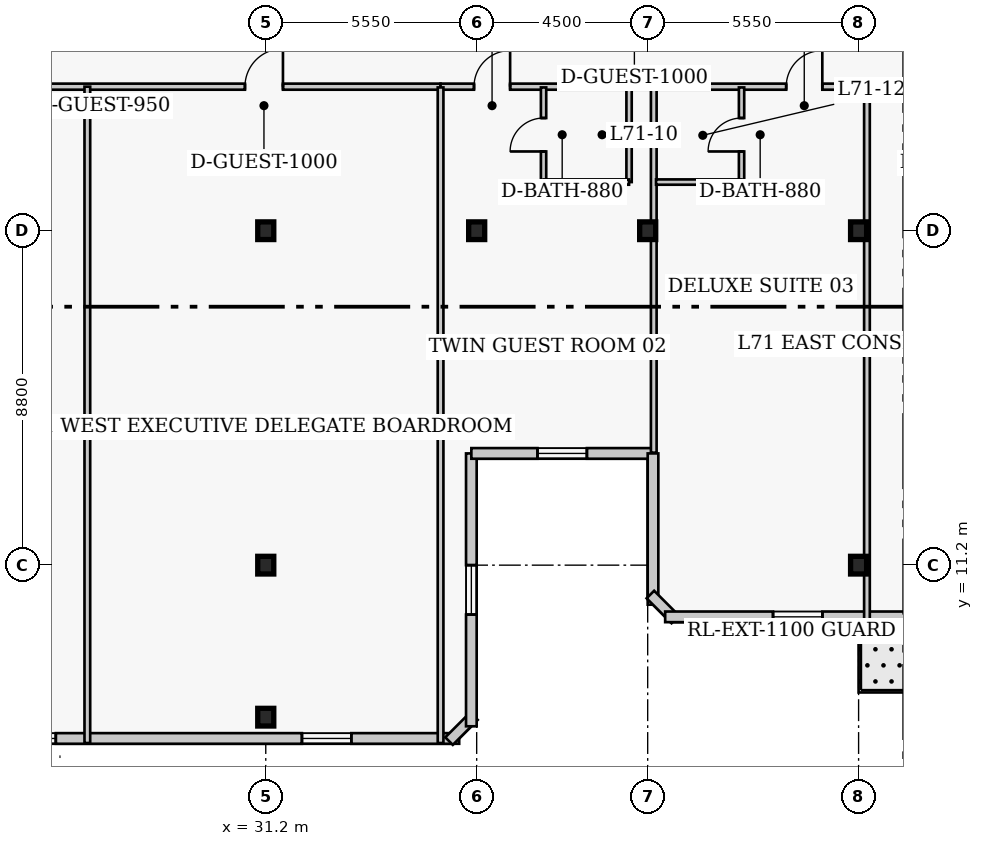
"""IFC4 building model, lengths in metres.
Left out: names, types, materials, properties, quantities, classifications, styles, units other than length and angle.
Written with IfcOpenShell. Run it as: python <this file> out.ifc"""

import sys

from ifc_helpers import new_model, si_unit, direction, frame, frame_2d, origin, origin_2d, place, context, subcontext, project, spatial, rectangle, i_section, extrude, element, fill, save


model = new_model("IFC4")
c1 = context("Model", 3, precision=1e-05, world=origin(), true_north=direction((0.0, 1.0)))
c2 = subcontext(c1, "Body", "Model", "MODEL_VIEW")
j1 = project(units=[si_unit("LENGTHUNIT", "METRE"), si_unit("PLANEANGLEUNIT", "RADIAN")], contexts=[c1])
p1 = place(None, origin())
s1 = spatial("IfcSite", under=j1, at=p1, CompositionType="ELEMENT")
p2 = place(p1, origin())
s2 = spatial("IfcBuilding", under=s1, at=p2, CompositionType="ELEMENT")
p3 = place(p2, frame((0.0, 0.0, 285.4)))
s3 = spatial("IfcBuildingStorey", under=s2, at=p3, CompositionType="ELEMENT", Elevation=285.4)
for number, where, z_axis, x_axis in (
    (1, (31.2, 11.2, 0.0), (0.0, 0.0, 1.0), (1.0, 0.0, 0.0)),
    (2, (31.2, 20.0, 0.0), (0.0, 0.0, 1.0), (1.0, 0.0, 0.0)),
    (3, (36.75, 20.0, 0.0), (0.0, 0.0, 1.0), (1.0, 0.0, 0.0)),
    (4, (41.25, 20.0, 0.0), (0.0, 0.0, 1.0), (1.0, 0.0, 0.0)),
    (5, (46.8, 11.2, 0.0), (0.0, 0.0, 1.0), (1.0, 0.0, 0.0)),
    (6, (46.8, 20.0, 0.0), (0.0, 0.0, 1.0), (1.0, 0.0, 0.0)),
    (7, (31.2, 7.2, 0.0), (0.0, 0.0, 1.0), (1.0, 0.0, 0.0)),
):
    element("IfcColumn", number, at=place(p3, frame(where, z_axis=z_axis, x_axis=x_axis)), inside=s3, PredefinedType="COLUMN", context=c2, shape_type="SweptSolid", body=[
        extrude(i_section(OverallWidth=0.422, OverallDepth=0.465, WebThickness=0.045, FlangeThickness=0.073, FilletRadius=0.017, at=origin_2d()), origin(), (0.0, 0.0, 1.0), 4.0),
    ])
p4 = place(p3, frame((11.46, 6.64, 0.0), z_axis=(0.0, 0.0, 1.0), x_axis=(1.0, 0.0, 0.0)))
e8 = element("IfcWall", 8, at=p4, inside=s3, PredefinedType="SOLIDWALL", context=c2, shape_type="SweptSolid", body=[
    extrude(rectangle(XDim=24.83, YDim=0.28, at=frame_2d((12.415, 0.0))), origin(), (0.0, 0.0, 1.0), 3.76),
])
p5 = place(p4, frame((3.488, 0.0, 0.85)))
e9 = element("IfcOpeningElement", 9, at=p5, cuts=e8, PredefinedType="OPENING", context=c2, shape_type="SweptSolid", body=[
    extrude(rectangle(XDim=1.3, YDim=1.7, at=frame_2d((0.65, 0.85))), frame((0.0, 0.15, 0.0), z_axis=(0.0, -1.0, 0.0), x_axis=(1.0, 0.0, 0.0)), (0.0, 0.0, 1.0), 0.3),
])
p6 = place(p4, frame((12.915, 0.0, 0.85)))
e10 = element("IfcOpeningElement", 10, at=p6, cuts=e8, PredefinedType="OPENING", context=c2, shape_type="SweptSolid", body=[
    extrude(rectangle(XDim=1.3, YDim=1.7, at=frame_2d((0.65, 0.85))), frame((0.0, 0.15, 0.0), z_axis=(0.0, -1.0, 0.0), x_axis=(1.0, 0.0, 0.0)), (0.0, 0.0, 1.0), 0.3),
])
p7 = place(p4, frame((20.692, 0.0, 0.85)))
e11 = element("IfcOpeningElement", 11, at=p7, cuts=e8, PredefinedType="OPENING", context=c2, shape_type="SweptSolid", body=[
    extrude(rectangle(XDim=1.3, YDim=1.7, at=frame_2d((0.65, 0.85))), frame((0.0, 0.15, 0.0), z_axis=(0.0, -1.0, 0.0), x_axis=(1.0, 0.0, 0.0)), (0.0, 0.0, 1.0), 0.3),
])
p8 = place(p3, frame((36.023, 6.571, 0.0), z_axis=(0.0, 0.0, 1.0), x_axis=(0.707106781187, 0.707106781187, 0.0)))
e12 = element("IfcWall", 12, at=p8, inside=s3, PredefinedType="SOLIDWALL", context=c2, shape_type="SweptSolid", body=[
    extrude(rectangle(XDim=0.928, YDim=0.28, at=frame_2d((0.464, 0.0))), origin(), (0.0, 0.0, 1.0), 3.76),
])
p9 = place(p3, frame((36.61, 6.96, 0.0), z_axis=(0.0, 0.0, 1.0), x_axis=(0.0, 1.0, 0.0)))
e13 = element("IfcWall", 13, at=p9, inside=s3, PredefinedType="SOLIDWALL", context=c2, shape_type="SweptSolid", body=[
    extrude(rectangle(XDim=7.18, YDim=0.28, at=frame_2d((3.59, 0.0))), origin(), (0.0, 0.0, 1.0), 3.76),
])
p10 = place(p9, frame((2.94, 0.0, 0.85)))
e14 = element("IfcOpeningElement", 14, at=p10, cuts=e13, PredefinedType="OPENING", context=c2, shape_type="SweptSolid", body=[
    extrude(rectangle(XDim=1.3, YDim=1.7, at=frame_2d((0.65, 0.85))), frame((0.0, 0.15, 0.0), z_axis=(0.0, -1.0, 0.0), x_axis=(1.0, 0.0, 0.0)), (0.0, 0.0, 1.0), 0.3),
])
p11 = place(p3, frame((36.61, 14.14, 0.0), z_axis=(0.0, 0.0, 1.0), x_axis=(1.0, 0.0, 0.0)))
e15 = element("IfcWall", 15, at=p11, inside=s3, PredefinedType="SOLIDWALL", context=c2, shape_type="SweptSolid", body=[
    extrude(rectangle(XDim=4.78, YDim=0.28, at=frame_2d((2.39, 0.0))), origin(), (0.0, 0.0, 1.0), 3.76),
])
p12 = place(p11, frame((1.74, 0.0, 0.85)))
e16 = element("IfcOpeningElement", 16, at=p12, cuts=e15, PredefinedType="OPENING", context=c2, shape_type="SweptSolid", body=[
    extrude(rectangle(XDim=1.3, YDim=1.7, at=frame_2d((0.65, 0.85))), frame((0.0, 0.15, 0.0), z_axis=(0.0, -1.0, 0.0), x_axis=(1.0, 0.0, 0.0)), (0.0, 0.0, 1.0), 0.3),
])
p13 = place(p3, frame((41.39, 14.14, 0.0), z_axis=(0.0, 0.0, 1.0), x_axis=(0.0, -1.0, 0.0)))
e17 = element("IfcWall", 17, at=p13, inside=s3, PredefinedType="SOLIDWALL", context=c2, shape_type="SweptSolid", body=[
    extrude(rectangle(XDim=3.98, YDim=0.28, at=frame_2d((1.99, 0.0))), origin(), (0.0, 0.0, 1.0), 3.76),
])
p14 = place(p3, frame((41.321, 10.427, 0.0), z_axis=(0.0, 0.0, 1.0), x_axis=(0.707106781187, -0.707106781187, 0.0)))
e18 = element("IfcWall", 18, at=p14, inside=s3, PredefinedType="SOLIDWALL", context=c2, shape_type="SweptSolid", body=[
    extrude(rectangle(XDim=0.928, YDim=0.28, at=frame_2d((0.464, 0.0))), origin(), (0.0, 0.0, 1.0), 3.76),
])
p15 = place(p3, frame((41.71, 9.84, 0.0), z_axis=(0.0, 0.0, 1.0), x_axis=(1.0, 0.0, 0.0)))
e19 = element("IfcWall", 19, at=p15, inside=s3, PredefinedType="SOLIDWALL", context=c2, shape_type="SweptSolid", body=[
    extrude(rectangle(XDim=24.83, YDim=0.28, at=frame_2d((12.415, 0.0))), origin(), (0.0, 0.0, 1.0), 3.76),
])
p16 = place(p15, frame((8.29, 0.0, 0.0)))
e20 = element("IfcOpeningElement", 20, at=p16, cuts=e19, PredefinedType="OPENING", context=c2, shape_type="SweptSolid", body=[
    extrude(rectangle(XDim=1.4, YDim=2.15, at=frame_2d((0.7, 1.075))), frame((0.0, 0.15, 0.0), z_axis=(0.0, -1.0, 0.0), x_axis=(1.0, 0.0, 0.0)), (0.0, 0.0, 1.0), 0.3),
])
p17 = place(p15, frame((2.838, 0.0, 0.85)))
e21 = element("IfcOpeningElement", 21, at=p17, cuts=e19, PredefinedType="OPENING", context=c2, shape_type="SweptSolid", body=[
    extrude(rectangle(XDim=1.3, YDim=1.7, at=frame_2d((0.65, 0.85))), frame((0.0, 0.15, 0.0), z_axis=(0.0, -1.0, 0.0), x_axis=(1.0, 0.0, 0.0)), (0.0, 0.0, 1.0), 0.3),
])
p18 = place(p15, frame((18.892, 0.0, 0.85)))
e22 = element("IfcOpeningElement", 22, at=p18, cuts=e19, PredefinedType="OPENING", context=c2, shape_type="SweptSolid", body=[
    extrude(rectangle(XDim=1.3, YDim=1.7, at=frame_2d((0.65, 0.85))), frame((0.0, 0.15, 0.0), z_axis=(0.0, -1.0, 0.0), x_axis=(1.0, 0.0, 0.0)), (0.0, 0.0, 1.0), 0.3),
])
p19 = place(p15, frame((13.085, 0.0, 0.85)))
e23 = element("IfcOpeningElement", 23, at=p19, cuts=e19, PredefinedType="OPENING", context=c2, shape_type="SweptSolid", body=[
    extrude(rectangle(XDim=1.3, YDim=1.7, at=frame_2d((0.65, 0.85))), frame((0.0, 0.15, 0.0), z_axis=(0.0, -1.0, 0.0), x_axis=(1.0, 0.0, 0.0)), (0.0, 0.0, 1.0), 0.3),
])
p20 = place(p3, frame((19.35, 23.79, 0.0), z_axis=(0.0, 0.0, 1.0), x_axis=(1.0, 0.0, 0.0)))
e24 = element("IfcWall", 24, at=p20, inside=s3, PredefinedType="PARTITIONING", context=c2, shape_type="SweptSolid", body=[
    extrude(rectangle(XDim=16.45, YDim=0.16, at=frame_2d((8.225, 0.0))), origin(), (0.0, 0.0, 1.0), 3.76),
])
p21 = place(p20, frame((4.288, 0.0, 0.0)))
e25 = element("IfcOpeningElement", 25, at=p21, cuts=e24, PredefinedType="OPENING", context=c2, shape_type="SweptSolid", body=[
    extrude(rectangle(XDim=0.95, YDim=2.1, at=frame_2d((0.475, 1.05))), frame((0.0, 0.09, 0.0), z_axis=(0.0, -1.0, 0.0), x_axis=(1.0, 0.0, 0.0)), (0.0, 0.0, 1.0), 0.18),
])
p22 = place(p20, frame((11.302, 0.0, 0.0)))
e26 = element("IfcOpeningElement", 26, at=p22, cuts=e24, PredefinedType="OPENING", context=c2, shape_type="SweptSolid", body=[
    extrude(rectangle(XDim=1.0, YDim=2.15, at=frame_2d((0.5, 1.075))), frame((0.0, 0.09, 0.0), z_axis=(0.0, -1.0, 0.0), x_axis=(1.0, 0.0, 0.0)), (0.0, 0.0, 1.0), 0.18),
])
p23 = place(p3, frame((35.8, 23.79, 0.0), z_axis=(0.0, 0.0, 1.0), x_axis=(1.0, 0.0, 0.0)))
e27 = element("IfcWall", 27, at=p23, inside=s3, PredefinedType="PARTITIONING", context=c2, shape_type="SweptSolid", body=[
    extrude(rectangle(XDim=24.66, YDim=0.16, at=frame_2d((12.33, 0.0))), origin(), (0.0, 0.0, 1.0), 3.76),
])
p24 = place(p23, frame((0.88, 0.0, 0.0)))
e28 = element("IfcOpeningElement", 28, at=p24, cuts=e27, PredefinedType="OPENING", context=c2, shape_type="SweptSolid", body=[
    extrude(rectangle(XDim=0.95, YDim=2.1, at=frame_2d((0.475, 1.05))), frame((0.0, 0.09, 0.0), z_axis=(0.0, -1.0, 0.0), x_axis=(1.0, 0.0, 0.0)), (0.0, 0.0, 1.0), 0.18),
])
p25 = place(p23, frame((9.095, 0.0, 0.0)))
e29 = element("IfcOpeningElement", 29, at=p25, cuts=e27, PredefinedType="OPENING", context=c2, shape_type="SweptSolid", body=[
    extrude(rectangle(XDim=0.95, YDim=2.1, at=frame_2d((0.475, 1.05))), frame((0.0, 0.09, 0.0), z_axis=(0.0, -1.0, 0.0), x_axis=(1.0, 0.0, 0.0)), (0.0, 0.0, 1.0), 0.18),
])
p26 = place(p23, frame((13.525, 0.0, 0.0)))
e30 = element("IfcOpeningElement", 30, at=p26, cuts=e27, PredefinedType="OPENING", context=c2, shape_type="SweptSolid", body=[
    extrude(rectangle(XDim=1.0, YDim=2.15, at=frame_2d((0.5, 1.075))), frame((0.0, 0.09, 0.0), z_axis=(0.0, -1.0, 0.0), x_axis=(1.0, 0.0, 0.0)), (0.0, 0.0, 1.0), 0.18),
])
p27 = place(p23, frame((18.005, 0.0, 0.0)))
e31 = element("IfcOpeningElement", 31, at=p27, cuts=e27, PredefinedType="OPENING", context=c2, shape_type="SweptSolid", body=[
    extrude(rectangle(XDim=0.95, YDim=2.1, at=frame_2d((0.475, 1.05))), frame((0.0, 0.09, 0.0), z_axis=(0.0, -1.0, 0.0), x_axis=(1.0, 0.0, 0.0)), (0.0, 0.0, 1.0), 0.18),
])
p28 = place(p23, frame((23.115, 0.0, 0.0)))
e32 = element("IfcOpeningElement", 32, at=p28, cuts=e27, PredefinedType="OPENING", context=c2, shape_type="SweptSolid", body=[
    extrude(rectangle(XDim=0.95, YDim=2.1, at=frame_2d((0.475, 1.05))), frame((0.0, 0.09, 0.0), z_axis=(0.0, -1.0, 0.0), x_axis=(1.0, 0.0, 0.0)), (0.0, 0.0, 1.0), 0.18),
])
p29 = place(p3, frame((26.505, 6.52, 0.0), z_axis=(0.0, 0.0, 1.0), x_axis=(0.0, 1.0, 0.0)))
e33 = element("IfcWall", 33, at=p29, inside=s3, PredefinedType="PARTITIONING", context=c2, shape_type="SweptSolid", body=[
    extrude(rectangle(XDim=17.27, YDim=0.15, at=frame_2d((8.635, 0.0))), origin(), (0.0, 0.0, 1.0), 3.76),
])
p30 = place(p3, frame((35.8, 6.52, 0.0), z_axis=(0.0, 0.0, 1.0), x_axis=(0.0, 1.0, 0.0)))
e34 = element("IfcWall", 34, at=p30, inside=s3, PredefinedType="PARTITIONING", context=c2, shape_type="SweptSolid", body=[
    extrude(rectangle(XDim=17.25, YDim=0.15, at=frame_2d((8.625, 0.0))), origin(), (0.0, 0.0, 1.0), 3.76),
])
p31 = place(p3, frame((38.51, 21.28, 0.0), z_axis=(0.0, 0.0, 1.0), x_axis=(0.0, 1.0, 0.0)))
e35 = element("IfcWall", 35, at=p31, inside=s3, PredefinedType="PLUMBINGWALL", context=c2, shape_type="SweptSolid", body=[
    extrude(rectangle(XDim=2.49, YDim=0.14, at=frame_2d((1.245, 0.0))), origin(), (0.0, 0.0, 1.0), 3.76),
])
p32 = place(p31, frame((0.805, 0.0, 0.0)))
e36 = element("IfcOpeningElement", 36, at=p32, cuts=e35, PredefinedType="OPENING", context=c2, shape_type="SweptSolid", body=[
    extrude(rectangle(XDim=0.88, YDim=2.05, at=frame_2d((0.44, 1.025))), frame((0.0, 0.08, 0.0), z_axis=(0.0, -1.0, 0.0), x_axis=(1.0, 0.0, 0.0)), (0.0, 0.0, 1.0), 0.16),
])
p33 = place(p3, frame((40.76, 21.28, 0.0), z_axis=(0.0, 0.0, 1.0), x_axis=(0.0, 1.0, 0.0)))
e37 = element("IfcWall", 37, at=p33, inside=s3, PredefinedType="PLUMBINGWALL", context=c2, shape_type="SweptSolid", body=[
    extrude(rectangle(XDim=2.49, YDim=0.14, at=frame_2d((1.245, 0.0))), origin(), (0.0, 0.0, 1.0), 3.76),
])
p34 = place(p3, frame((38.51, 21.28, 0.0), z_axis=(0.0, 0.0, 1.0), x_axis=(1.0, 0.0, 0.0)))
e38 = element("IfcWall", 38, at=p34, inside=s3, PredefinedType="PLUMBINGWALL", context=c2, shape_type="SweptSolid", body=[
    extrude(rectangle(XDim=2.25, YDim=0.14, at=frame_2d((1.125, 0.0))), origin(), (0.0, 0.0, 1.0), 3.76),
])
p35 = place(p3, frame((41.41, 14.16, 0.0), z_axis=(0.0, 0.0, 1.0), x_axis=(0.0, 1.0, 0.0)))
e39 = element("IfcWall", 39, at=p35, inside=s3, PredefinedType="PARTITIONING", context=c2, shape_type="SweptSolid", body=[
    extrude(rectangle(XDim=9.63, YDim=0.15, at=frame_2d((4.815, 0.0))), origin(), (0.0, 0.0, 1.0), 3.76),
])
p36 = place(p3, frame((43.72, 21.28, 0.0), z_axis=(0.0, 0.0, 1.0), x_axis=(0.0, 1.0, 0.0)))
e40 = element("IfcWall", 40, at=p36, inside=s3, PredefinedType="PLUMBINGWALL", context=c2, shape_type="SweptSolid", body=[
    extrude(rectangle(XDim=2.49, YDim=0.14, at=frame_2d((1.245, 0.0))), origin(), (0.0, 0.0, 1.0), 3.76),
])
p37 = place(p36, frame((0.805, 0.0, 0.0)))
e41 = element("IfcOpeningElement", 41, at=p37, cuts=e40, PredefinedType="OPENING", context=c2, shape_type="SweptSolid", body=[
    extrude(rectangle(XDim=0.88, YDim=2.05, at=frame_2d((0.44, 1.025))), frame((0.0, 0.08, 0.0), z_axis=(0.0, -1.0, 0.0), x_axis=(1.0, 0.0, 0.0)), (0.0, 0.0, 1.0), 0.16),
])
p38 = place(p3, frame((41.47, 21.28, 0.0), z_axis=(0.0, 0.0, 1.0), x_axis=(1.0, 0.0, 0.0)))
e42 = element("IfcWall", 42, at=p38, inside=s3, PredefinedType="PLUMBINGWALL", context=c2, shape_type="SweptSolid", body=[
    extrude(rectangle(XDim=2.25, YDim=0.14, at=frame_2d((1.125, 0.0))), origin(), (0.0, 0.0, 1.0), 3.76),
])
p39 = place(p3, frame((47.02, 9.72, 0.0), z_axis=(0.0, 0.0, 1.0), x_axis=(0.0, 1.0, 0.0)))
e43 = element("IfcWall", 43, at=p39, inside=s3, PredefinedType="PARTITIONING", context=c2, shape_type="SweptSolid", body=[
    extrude(rectangle(XDim=14.07, YDim=0.15, at=frame_2d((7.035, 0.0))), origin(), (0.0, 0.0, 1.0), 3.064),
])
p40 = place(p6, origin())
e44 = element("IfcWindow", 44, at=p40, inside=s3, PartitioningType="SINGLE_PANEL", PredefinedType="WINDOW", context=c2, shape_type="SweptSolid", body=[
    extrude(rectangle(XDim=1.3, YDim=1.7, at=frame_2d((0.65, 0.85))), frame((0.0, 0.03, 0.0), z_axis=(0.0, -1.0, 0.0), x_axis=(1.0, 0.0, 0.0)), (0.0, 0.0, 1.0), 0.06),
])
fill(e10, e44)
p41 = place(p7, origin())
e45 = element("IfcWindow", 45, at=p41, inside=s3, PartitioningType="SINGLE_PANEL", PredefinedType="WINDOW", context=c2, shape_type="SweptSolid", body=[
    extrude(rectangle(XDim=1.3, YDim=1.7, at=frame_2d((0.65, 0.85))), frame((0.0, 0.03, 0.0), z_axis=(0.0, -1.0, 0.0), x_axis=(1.0, 0.0, 0.0)), (0.0, 0.0, 1.0), 0.06),
])
fill(e11, e45)
p42 = place(p10, origin())
e46 = element("IfcWindow", 46, at=p42, inside=s3, PartitioningType="SINGLE_PANEL", PredefinedType="WINDOW", context=c2, shape_type="SweptSolid", body=[
    extrude(rectangle(XDim=1.3, YDim=1.7, at=frame_2d((0.65, 0.85))), frame((0.0, 0.03, 0.0), z_axis=(0.0, -1.0, 0.0), x_axis=(1.0, 0.0, 0.0)), (0.0, 0.0, 1.0), 0.06),
])
fill(e14, e46)
p43 = place(p12, origin())
e47 = element("IfcWindow", 47, at=p43, inside=s3, PartitioningType="SINGLE_PANEL", PredefinedType="WINDOW", context=c2, shape_type="SweptSolid", body=[
    extrude(rectangle(XDim=1.3, YDim=1.7, at=frame_2d((0.65, 0.85))), frame((0.0, 0.03, 0.0), z_axis=(0.0, -1.0, 0.0), x_axis=(1.0, 0.0, 0.0)), (0.0, 0.0, 1.0), 0.06),
])
fill(e16, e47)
p44 = place(p17, origin())
e48 = element("IfcWindow", 48, at=p44, inside=s3, PartitioningType="SINGLE_PANEL", PredefinedType="WINDOW", context=c2, shape_type="SweptSolid", body=[
    extrude(rectangle(XDim=1.3, YDim=1.7, at=frame_2d((0.65, 0.85))), frame((0.0, 0.03, 0.0), z_axis=(0.0, -1.0, 0.0), x_axis=(1.0, 0.0, 0.0)), (0.0, 0.0, 1.0), 0.06),
])
fill(e21, e48)
p45 = place(p22, origin())
e49 = element("IfcDoor", 49, at=p45, inside=s3, OperationType="SINGLE_SWING_RIGHT", PredefinedType="DOOR", context=c2, shape_type="SweptSolid", body=[
    extrude(rectangle(XDim=1.0, YDim=2.15, at=frame_2d((0.5, 1.075))), frame((0.0, 0.025, 0.0), z_axis=(0.0, -1.0, 0.0), x_axis=(1.0, 0.0, 0.0)), (0.0, 0.0, 1.0), 0.05),
])
fill(e26, e49)
p46 = place(p32, origin())
e50 = element("IfcDoor", 50, at=p46, inside=s3, OperationType="SINGLE_SWING_LEFT", PredefinedType="DOOR", context=c2, shape_type="SweptSolid", body=[
    extrude(rectangle(XDim=0.88, YDim=2.05, at=frame_2d((0.44, 1.025))), frame((0.0, 0.025, 0.0), z_axis=(0.0, -1.0, 0.0), x_axis=(1.0, 0.0, 0.0)), (0.0, 0.0, 1.0), 0.05),
])
fill(e36, e50)
p47 = place(p24, origin())
e51 = element("IfcDoor", 51, at=p47, inside=s3, OperationType="SINGLE_SWING_RIGHT", PredefinedType="DOOR", context=c2, shape_type="SweptSolid", body=[
    extrude(rectangle(XDim=0.95, YDim=2.1, at=frame_2d((0.475, 1.05))), frame((0.0, 0.025, 0.0), z_axis=(0.0, -1.0, 0.0), x_axis=(1.0, 0.0, 0.0)), (0.0, 0.0, 1.0), 0.05),
])
fill(e28, e51)
p48 = place(p37, origin())
e52 = element("IfcDoor", 52, at=p48, inside=s3, OperationType="SINGLE_SWING_LEFT", PredefinedType="DOOR", context=c2, shape_type="SweptSolid", body=[
    extrude(rectangle(XDim=0.88, YDim=2.05, at=frame_2d((0.44, 1.025))), frame((0.0, 0.025, 0.0), z_axis=(0.0, -1.0, 0.0), x_axis=(1.0, 0.0, 0.0)), (0.0, 0.0, 1.0), 0.05),
])
fill(e41, e52)
p49 = place(p25, origin())
e53 = element("IfcDoor", 53, at=p49, inside=s3, OperationType="SINGLE_SWING_RIGHT", PredefinedType="DOOR", context=c2, shape_type="SweptSolid", body=[
    extrude(rectangle(XDim=0.95, YDim=2.1, at=frame_2d((0.475, 1.05))), frame((0.0, 0.025, 0.0), z_axis=(0.0, -1.0, 0.0), x_axis=(1.0, 0.0, 0.0)), (0.0, 0.0, 1.0), 0.05),
])
fill(e29, e53)
save(model, sys.argv[1])
